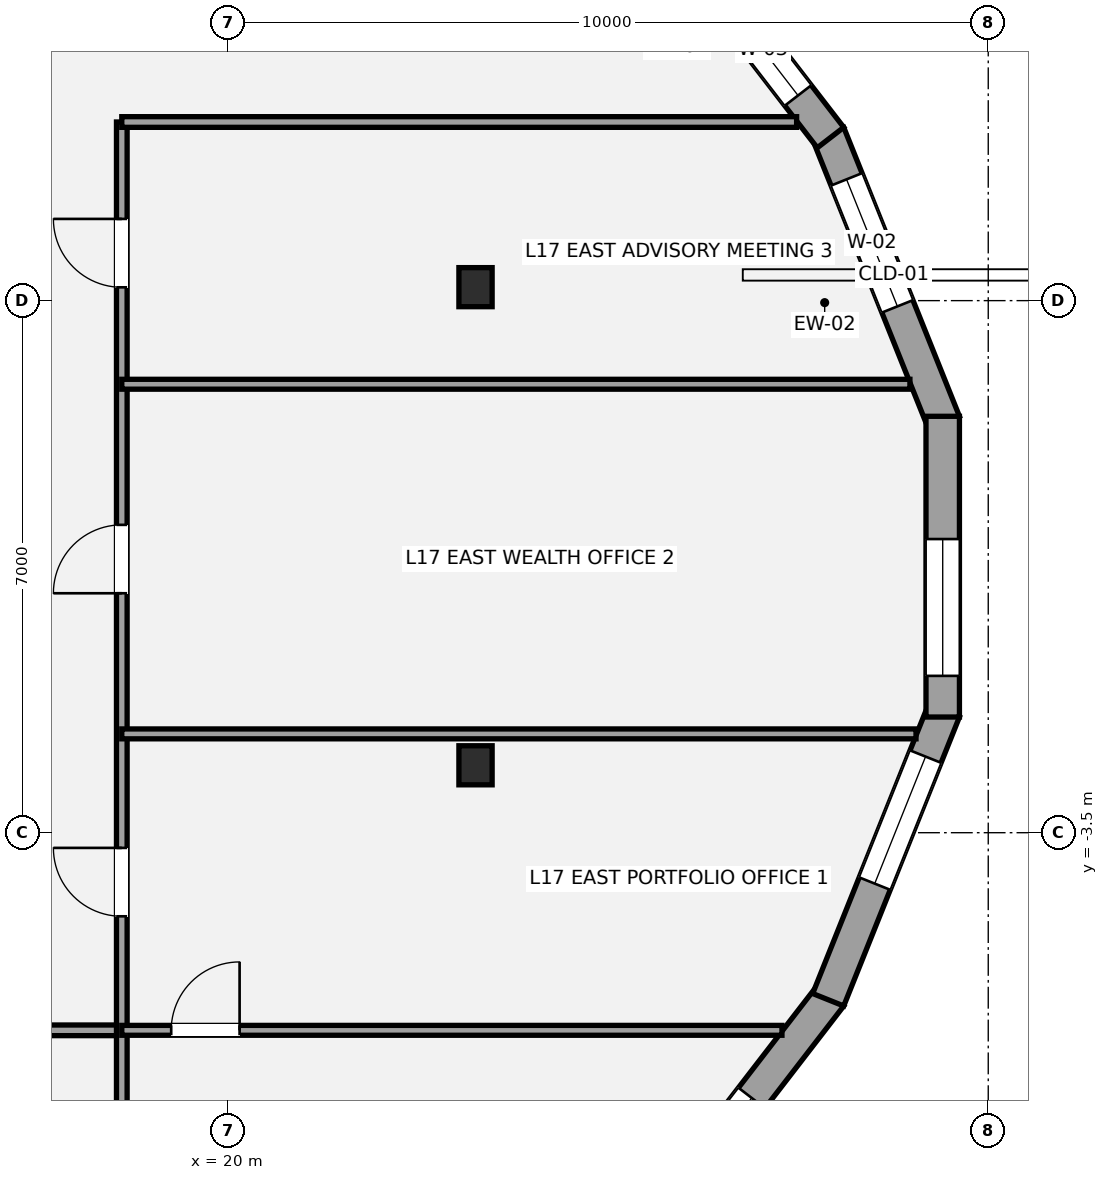
"""IFC4 building model, lengths in metres.
Left out: names, types, materials, properties, quantities, classifications, styles, units other than length and angle.
Written with IfcOpenShell. Run it as: python <this file> out.ifc"""

import sys

from ifc_helpers import new_model, si_unit, direction, frame, frame_2d, origin, origin_2d, place, context, subcontext, project, spatial, rectangle, i_section, extrude, element, fill, save


model = new_model("IFC4")
c1 = context("Model", 3, precision=1e-05, world=origin(), true_north=direction((0.0, 1.0)))
c2 = subcontext(c1, "Body", "Model", "MODEL_VIEW")
j1 = project(units=[si_unit("LENGTHUNIT", "METRE"), si_unit("PLANEANGLEUNIT", "RADIAN")], contexts=[c1])
p1 = place(None, origin())
s1 = spatial("IfcSite", under=j1, at=p1, CompositionType="ELEMENT")
p2 = place(p1, origin())
s2 = spatial("IfcBuilding", under=s1, at=p2, CompositionType="ELEMENT")
p3 = place(p2, frame((0.0, 0.0, 66.6)))
s3 = spatial("IfcBuildingStorey", under=s2, at=p3, CompositionType="ELEMENT", Elevation=66.6)
for number, where, z_axis, x_axis in (
    (1, (23.254, 3.677, 0.0), (0.0, 0.0, 1.0), (1.0, 0.0, 0.0)),
    (2, (23.254, -2.613, 0.0), (0.0, 0.0, 1.0), (1.0, 0.0, 0.0)),
):
    element("IfcColumn", number, at=place(p3, frame(where, z_axis=z_axis, x_axis=x_axis)), inside=s3, PredefinedType="COLUMN", context=c2, shape_type="SweptSolid", body=[
        extrude(i_section(OverallWidth=0.437, OverallDepth=0.514, WebThickness=0.061, FlangeThickness=0.097, at=origin_2d()), origin(), (0.0, 0.0, 1.0), 3.6),
    ])
p4 = place(p3, frame((27.895, 5.698, 0.0), z_axis=(0.0, 0.0, 1.0), x_axis=(0.37175044344, -0.928332703185, 0.0)))
e3 = element("IfcWall", 3, at=p4, inside=s3, PredefinedType="STANDARD", context=c2, shape_type="SweptSolid", body=[
    extrude(rectangle(XDim=4.095, YDim=0.44, at=frame_2d((2.047, 0.0))), origin(), (0.0, 0.0, 1.0), 2.529),
])
p5 = place(p4, frame((0.649, 0.0, 0.65)))
e4 = element("IfcOpeningElement", 4, at=p5, cuts=e3, PredefinedType="OPENING", context=c2, shape_type="SweptSolid", body=[
    extrude(rectangle(XDim=1.8, YDim=1.7, at=frame_2d((0.9, 0.85))), frame((0.0, 0.23, 0.0), z_axis=(0.0, -1.0, 0.0), x_axis=(1.0, 0.0, 0.0)), (0.0, 0.0, 1.0), 0.46),
])
p6 = place(p3, frame((25.27, 9.087, 0.0), z_axis=(0.0, 0.0, 1.0), x_axis=(0.610684735824, -0.791873824187, 0.0)))
e5 = element("IfcWall", 5, at=p6, inside=s3, PredefinedType="STANDARD", context=c2, shape_type="SweptSolid", body=[
    extrude(rectangle(XDim=4.347, YDim=0.44, at=frame_2d((2.173, 0.0))), origin(), (0.0, 0.0, 1.0), 2.529),
])
p7 = place(p6, frame((2.147, 0.0, 0.65)))
e6 = element("IfcOpeningElement", 6, at=p7, cuts=e5, PredefinedType="OPENING", context=c2, shape_type="SweptSolid", body=[
    extrude(rectangle(XDim=1.5, YDim=1.7, at=frame_2d((0.75, 0.85))), frame((0.0, 0.23, 0.0), z_axis=(0.0, -1.0, 0.0), x_axis=(1.0, 0.0, 0.0)), (0.0, 0.0, 1.0), 0.46),
])
p8 = place(p3, frame((27.925, -5.645, 0.0), z_axis=(0.0, 0.0, 1.0), x_axis=(-0.610684735824, -0.791873824187, 0.0)))
e7 = element("IfcWall", 7, at=p8, inside=s3, PredefinedType="STANDARD", context=c2, shape_type="SweptSolid", body=[
    extrude(rectangle(XDim=4.347, YDim=0.44, at=frame_2d((2.173, 0.0))), origin(), (0.0, 0.0, 1.0), 2.529),
])
p9 = place(p8, frame((1.698, 0.0, 0.65)))
e8 = element("IfcOpeningElement", 8, at=p9, cuts=e7, PredefinedType="OPENING", context=c2, shape_type="SweptSolid", body=[
    extrude(rectangle(XDim=1.8, YDim=1.7, at=frame_2d((0.9, 0.85))), frame((0.0, 0.23, 0.0), z_axis=(0.0, -1.0, 0.0), x_axis=(1.0, 0.0, 0.0)), (0.0, 0.0, 1.0), 0.46),
])
p10 = place(p3, frame((29.417, -1.896, 0.0), z_axis=(0.0, 0.0, 1.0), x_axis=(-0.37175044344, -0.928332703185, 0.0)))
e9 = element("IfcWall", 9, at=p10, inside=s3, PredefinedType="STANDARD", context=c2, shape_type="SweptSolid", body=[
    extrude(rectangle(XDim=4.095, YDim=0.44, at=frame_2d((2.047, 0.0))), origin(), (0.0, 0.0, 1.0), 2.529),
])
p11 = place(p10, frame((0.649, 0.0, 0.65)))
e10 = element("IfcOpeningElement", 10, at=p11, cuts=e9, PredefinedType="OPENING", context=c2, shape_type="SweptSolid", body=[
    extrude(rectangle(XDim=1.8, YDim=1.7, at=frame_2d((0.9, 0.85))), frame((0.0, 0.23, 0.0), z_axis=(0.0, -1.0, 0.0), x_axis=(1.0, 0.0, 0.0)), (0.0, 0.0, 1.0), 0.46),
])
p12 = place(p3, frame((29.401, 1.978, 0.0), z_axis=(0.0, 0.0, 1.0), x_axis=(0.0, -1.0, 0.0)))
e11 = element("IfcWall", 11, at=p12, inside=s3, PredefinedType="STANDARD", context=c2, shape_type="SweptSolid", body=[
    extrude(rectangle(XDim=3.957, YDim=0.44, at=frame_2d((1.978, 0.0))), origin(), (0.0, 0.0, 1.0), 2.533),
])
p13 = place(p12, frame((1.615, 0.0, 0.65)))
e12 = element("IfcOpeningElement", 12, at=p13, cuts=e11, PredefinedType="OPENING", context=c2, shape_type="SweptSolid", body=[
    extrude(rectangle(XDim=1.8, YDim=1.7, at=frame_2d((0.9, 0.85))), frame((0.0, 0.23, 0.0), z_axis=(0.0, -1.0, 0.0), x_axis=(1.0, 0.0, 0.0)), (0.0, 0.0, 1.0), 0.46),
])
p14 = place(p3, frame((-16.1, -6.1, 0.0), z_axis=(0.0, 0.0, 1.0), x_axis=(1.0, 0.0, 0.0)))
e13 = element("IfcWall", 13, at=p14, inside=s3, PredefinedType="PARTITIONING", context=c2, shape_type="SweptSolid", body=[
    extrude(rectangle(XDim=34.7, YDim=0.14, at=frame_2d((17.35, 0.0))), origin(), (0.0, 0.0, 1.0), 2.853),
])
p15 = place(p14, frame((8.1, 0.0, 0.0)))
e14 = element("IfcOpeningElement", 14, at=p15, cuts=e13, PredefinedType="OPENING", context=c2, shape_type="SweptSolid", body=[
    extrude(rectangle(XDim=0.9, YDim=2.1, at=frame_2d((0.45, 1.05))), frame((0.0, 0.08, 0.0), z_axis=(0.0, -1.0, 0.0), x_axis=(1.0, 0.0, 0.0)), (0.0, 0.0, 1.0), 0.16),
])
p16 = place(p14, frame((25.45, 0.0, 0.0)))
e15 = element("IfcOpeningElement", 15, at=p16, cuts=e13, PredefinedType="OPENING", context=c2, shape_type="SweptSolid", body=[
    extrude(rectangle(XDim=0.9, YDim=2.1, at=frame_2d((0.45, 1.05))), frame((0.0, 0.08, 0.0), z_axis=(0.0, -1.0, 0.0), x_axis=(1.0, 0.0, 0.0)), (0.0, 0.0, 1.0), 0.16),
])
p17 = place(p3, frame((18.6, -13.996, 0.0), z_axis=(0.0, 0.0, 1.0), x_axis=(0.0, 1.0, 0.0)))
e16 = element("IfcWall", 16, at=p17, inside=s3, PredefinedType="PARTITIONING", context=c2, shape_type="SweptSolid", body=[
    extrude(rectangle(XDim=19.846, YDim=0.14, at=frame_2d((9.923, 0.0))), origin(), (0.0, 0.0, 1.0), 2.779),
])
p18 = place(p17, frame((9.396, 0.0, 0.0)))
e17 = element("IfcOpeningElement", 17, at=p18, cuts=e16, PredefinedType="OPENING", context=c2, shape_type="SweptSolid", body=[
    extrude(rectangle(XDim=0.9, YDim=2.1, at=frame_2d((0.45, 1.05))), frame((0.0, 0.08, 0.0), z_axis=(0.0, -1.0, 0.0), x_axis=(1.0, 0.0, 0.0)), (0.0, 0.0, 1.0), 0.16),
])
p19 = place(p17, frame((13.646, 0.0, 0.0)))
e18 = element("IfcOpeningElement", 18, at=p19, cuts=e16, PredefinedType="OPENING", context=c2, shape_type="SweptSolid", body=[
    extrude(rectangle(XDim=0.9, YDim=2.1, at=frame_2d((0.45, 1.05))), frame((0.0, 0.08, 0.0), z_axis=(0.0, -1.0, 0.0), x_axis=(1.0, 0.0, 0.0)), (0.0, 0.0, 1.0), 0.16),
])
p20 = place(p17, frame((17.671, 0.0, 0.0)))
e19 = element("IfcOpeningElement", 19, at=p20, cuts=e16, PredefinedType="OPENING", context=c2, shape_type="SweptSolid", body=[
    extrude(rectangle(XDim=0.9, YDim=2.1, at=frame_2d((0.45, 1.05))), frame((0.0, 0.08, 0.0), z_axis=(0.0, -1.0, 0.0), x_axis=(1.0, 0.0, 0.0)), (0.0, 0.0, 1.0), 0.16),
])
p21 = place(p3, frame((18.6, 5.85, 0.0), z_axis=(0.0, 0.0, 1.0), x_axis=(1.0, 0.0, 0.0)))
e20 = element("IfcWall", 20, at=p21, inside=s3, PredefinedType="PARTITIONING", context=c2, shape_type="SweptSolid", body=[
    extrude(rectangle(XDim=8.879, YDim=0.14, at=frame_2d((4.439, 0.0))), origin(), (0.0, 0.0, 1.0), 2.853),
])
p22 = place(p3, frame((18.6, -6.1, 0.0), z_axis=(0.0, 0.0, 1.0), x_axis=(1.0, 0.0, 0.0)))
e21 = element("IfcWall", 21, at=p22, inside=s3, PredefinedType="PARTITIONING", context=c2, shape_type="SweptSolid", body=[
    extrude(rectangle(XDim=8.686, YDim=0.13, at=frame_2d((4.343, 0.0))), origin(), (0.0, 0.0, 1.0), 2.779),
])
p23 = place(p22, frame((0.65, 0.0, 0.0)))
e22 = element("IfcOpeningElement", 22, at=p23, cuts=e21, PredefinedType="OPENING", context=c2, shape_type="SweptSolid", body=[
    extrude(rectangle(XDim=0.9, YDim=2.1, at=frame_2d((0.45, 1.05))), frame((0.0, 0.075, 0.0), z_axis=(0.0, -1.0, 0.0), x_axis=(1.0, 0.0, 0.0)), (0.0, 0.0, 1.0), 0.15),
])
p24 = place(p3, frame((18.6, -2.2, 0.0), z_axis=(0.0, 0.0, 1.0), x_axis=(1.0, 0.0, 0.0)))
e23 = element("IfcWall", 23, at=p24, inside=s3, PredefinedType="PARTITIONING", context=c2, shape_type="SweptSolid", body=[
    extrude(rectangle(XDim=10.449, YDim=0.13, at=frame_2d((5.225, 0.0))), origin(), (0.0, 0.0, 1.0), 2.841),
])
p25 = place(p3, frame((18.6, 2.4, 0.0), z_axis=(0.0, 0.0, 1.0), x_axis=(1.0, 0.0, 0.0)))
e24 = element("IfcWall", 24, at=p25, inside=s3, PredefinedType="PARTITIONING", context=c2, shape_type="SweptSolid", body=[
    extrude(rectangle(XDim=10.369, YDim=0.13, at=frame_2d((5.185, 0.0))), origin(), (0.0, 0.0, 1.0), 2.841),
])
p26 = place(p5, origin())
e25 = element("IfcWindow", 25, at=p26, inside=s3, PartitioningType="SINGLE_PANEL", PredefinedType="WINDOW", context=c2, shape_type="SweptSolid", body=[
    extrude(rectangle(XDim=1.8, YDim=1.7, at=frame_2d((0.9, 0.85))), frame((0.0, -0.01, 0.0), z_axis=(0.0, -1.0, 0.0), x_axis=(1.0, 0.0, 0.0)), (0.0, 0.0, 1.0), 0.06),
])
fill(e4, e25)
p27 = place(p7, origin())
e26 = element("IfcWindow", 26, at=p27, inside=s3, PartitioningType="SINGLE_PANEL", PredefinedType="WINDOW", context=c2, shape_type="SweptSolid", body=[
    extrude(rectangle(XDim=1.5, YDim=1.7, at=frame_2d((0.75, 0.85))), frame((0.0, -0.01, 0.0), z_axis=(0.0, -1.0, 0.0), x_axis=(1.0, 0.0, 0.0)), (0.0, 0.0, 1.0), 0.06),
])
fill(e6, e26)
p28 = place(p9, origin())
e27 = element("IfcWindow", 27, at=p28, inside=s3, PartitioningType="SINGLE_PANEL", PredefinedType="WINDOW", context=c2, shape_type="SweptSolid", body=[
    extrude(rectangle(XDim=1.8, YDim=1.7, at=frame_2d((0.9, 0.85))), frame((0.0, -0.01, 0.0), z_axis=(0.0, -1.0, 0.0), x_axis=(1.0, 0.0, 0.0)), (0.0, 0.0, 1.0), 0.06),
])
fill(e8, e27)
p29 = place(p11, origin())
e28 = element("IfcWindow", 28, at=p29, inside=s3, PartitioningType="SINGLE_PANEL", PredefinedType="WINDOW", context=c2, shape_type="SweptSolid", body=[
    extrude(rectangle(XDim=1.8, YDim=1.7, at=frame_2d((0.9, 0.85))), frame((0.0, -0.01, 0.0), z_axis=(0.0, -1.0, 0.0), x_axis=(1.0, 0.0, 0.0)), (0.0, 0.0, 1.0), 0.06),
])
fill(e10, e28)
p30 = place(p13, origin())
e29 = element("IfcWindow", 29, at=p30, inside=s3, PartitioningType="SINGLE_PANEL", PredefinedType="WINDOW", context=c2, shape_type="SweptSolid", body=[
    extrude(rectangle(XDim=1.8, YDim=1.7, at=frame_2d((0.9, 0.85))), frame((0.0, -0.01, 0.0), z_axis=(0.0, -1.0, 0.0), x_axis=(1.0, 0.0, 0.0)), (0.0, 0.0, 1.0), 0.06),
])
fill(e12, e29)
p31 = place(p23, origin())
e30 = element("IfcDoor", 30, at=p31, inside=s3, OperationType="SINGLE_SWING_RIGHT", PredefinedType="DOOR", context=c2, shape_type="SweptSolid", body=[
    extrude(rectangle(XDim=0.9, YDim=2.1, at=frame_2d((0.45, 1.05))), frame((0.0, 0.025, 0.0), z_axis=(0.0, -1.0, 0.0), x_axis=(1.0, 0.0, 0.0)), (0.0, 0.0, 1.0), 0.05),
])
fill(e22, e30)
p32 = place(p18, origin())
e31 = element("IfcDoor", 31, at=p32, inside=s3, OperationType="SINGLE_SWING_RIGHT", PredefinedType="DOOR", context=c2, shape_type="SweptSolid", body=[
    extrude(rectangle(XDim=0.9, YDim=2.1, at=frame_2d((0.45, 1.05))), frame((0.0, 0.025, 0.0), z_axis=(0.0, -1.0, 0.0), x_axis=(1.0, 0.0, 0.0)), (0.0, 0.0, 1.0), 0.05),
])
fill(e17, e31)
p33 = place(p19, origin())
e32 = element("IfcDoor", 32, at=p33, inside=s3, OperationType="SINGLE_SWING_LEFT", PredefinedType="DOOR", context=c2, shape_type="SweptSolid", body=[
    extrude(rectangle(XDim=0.9, YDim=2.1, at=frame_2d((0.45, 1.05))), frame((0.0, 0.025, 0.0), z_axis=(0.0, -1.0, 0.0), x_axis=(1.0, 0.0, 0.0)), (0.0, 0.0, 1.0), 0.05),
])
fill(e18, e32)
p34 = place(p20, origin())
e33 = element("IfcDoor", 33, at=p34, inside=s3, OperationType="SINGLE_SWING_RIGHT", PredefinedType="DOOR", context=c2, shape_type="SweptSolid", body=[
    extrude(rectangle(XDim=0.9, YDim=2.1, at=frame_2d((0.45, 1.05))), frame((0.0, 0.025, 0.0), z_axis=(0.0, -1.0, 0.0), x_axis=(1.0, 0.0, 0.0)), (0.0, 0.0, 1.0), 0.05),
])
fill(e19, e33)
save(model, sys.argv[1])
